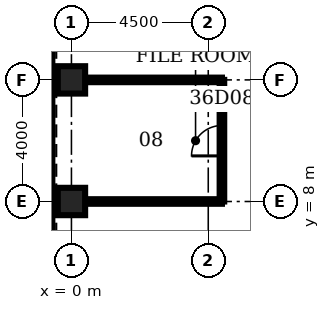
"""IFC4 building model, lengths in metres.
Left out: names, types, materials, properties, quantities, classifications, styles, units other than length and angle.
Written with IfcOpenShell. Run it as: python <this file> out.ifc"""

import sys

from ifc_helpers import new_model, si_unit, direction, frame, frame_2d, origin, origin_2d, place, context, subcontext, project, spatial, rectangle, hollow_rectangle, extrude, element, fill, save


model = new_model("IFC4")
c1 = context("Model", 3, precision=1e-05, world=origin(), true_north=direction((0.0, 1.0)))
c2 = subcontext(c1, "Body", "Model", "MODEL_VIEW")
j1 = project(units=[si_unit("LENGTHUNIT", "METRE"), si_unit("PLANEANGLEUNIT", "RADIAN")], contexts=[c1])
p1 = place(None, origin())
s1 = spatial("IfcSite", under=j1, at=p1, CompositionType="ELEMENT")
p2 = place(p1, origin())
s2 = spatial("IfcBuilding", under=s1, at=p2, CompositionType="ELEMENT")
p3 = place(p2, frame((0.0, 0.0, 163.5)))
s3 = spatial("IfcBuildingStorey", under=s2, at=p3, CompositionType="ELEMENT", Elevation=163.5)
for number, where, z_axis, x_axis in (
    (1, (0.0, 12.0, 0.0), (0.0, 0.0, 1.0), (1.0, 0.0, 0.0)),
    (2, (0.0, 8.0, 0.0), (0.0, 0.0, 1.0), (1.0, 0.0, 0.0)),
):
    element("IfcColumn", number, at=place(p3, frame(where, z_axis=z_axis, x_axis=x_axis)), inside=s3, PredefinedType="COLUMN", context=c2, shape_type="SweptSolid", body=[
        extrude(hollow_rectangle(XDim=0.9, YDim=0.9, WallThickness=0.09, at=origin_2d()), origin(), (0.0, 0.0, 1.0), 4.2),
    ])
for number, where, z_axis, x_axis in (
    (3, (0.45, 8.0, 0.0), (0.0, 0.0, 1.0), (1.0, 0.0, 0.0)),
    (4, (0.45, 12.0, 0.0), (0.0, 0.0, 1.0), (1.0, 0.0, 0.0)),
):
    element("IfcWall", number, at=place(p3, frame(where, z_axis=z_axis, x_axis=x_axis)), inside=s3, PredefinedType="PARTITIONING", context=c2, shape_type="SweptSolid", body=[
        extrude(rectangle(XDim=4.5, YDim=0.15, at=frame_2d((2.25, 0.0))), origin(), (0.0, 0.0, 1.0), 3.0),
    ])
p4 = place(p3, frame((4.95, 8.0, 0.0), z_axis=(0.0, 0.0, 1.0), x_axis=(0.0, 1.0, 0.0)))
e5 = element("IfcWall", 5, at=p4, inside=s3, PredefinedType="PARTITIONING", context=c2, shape_type="SweptSolid", body=[
    extrude(rectangle(XDim=4.0, YDim=0.15, at=frame_2d((2.0, 0.0))), origin(), (0.0, 0.0, 1.0), 3.0),
])
p5 = place(p4, frame((1.5, 0.0, 0.0)))
e6 = element("IfcOpeningElement", 6, at=p5, cuts=e5, PredefinedType="OPENING", context=c2, shape_type="SweptSolid", body=[
    extrude(rectangle(XDim=1.0, YDim=2.1, at=frame_2d((0.5, 1.05))), frame((0.0, 0.085, 0.0), z_axis=(0.0, -1.0, 0.0), x_axis=(1.0, 0.0, 0.0)), (0.0, 0.0, 1.0), 0.17),
])
p6 = place(p5, origin())
e7 = element("IfcDoor", 7, at=p6, inside=s3, OperationType="SINGLE_SWING_LEFT", PredefinedType="DOOR", context=c2, shape_type="SweptSolid", body=[
    extrude(rectangle(XDim=1.0, YDim=2.1, at=frame_2d((0.5, 1.05))), frame((0.0, 0.025, 0.0), z_axis=(0.0, -1.0, 0.0), x_axis=(1.0, 0.0, 0.0)), (0.0, 0.0, 1.0), 0.05),
])
fill(e6, e7)
save(model, sys.argv[1])
